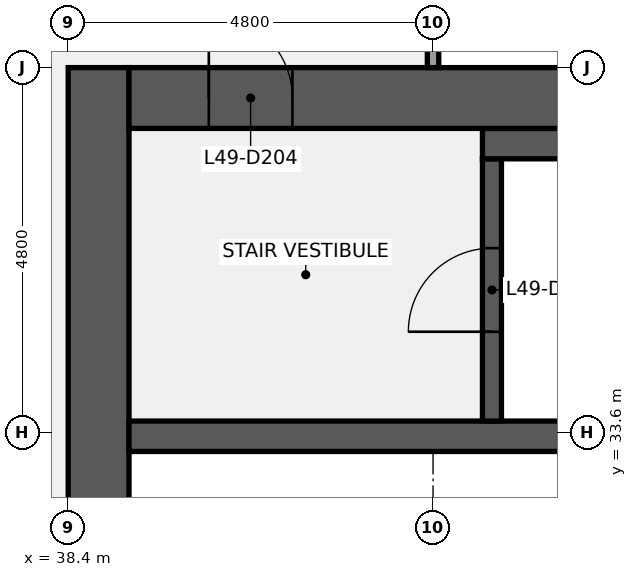
"""IFC4 building model, lengths in metres.
Left out: names, types, materials, properties, quantities, classifications, styles, units other than length and angle.
Written with IfcOpenShell. Run it as: python <this file> out.ifc"""

import sys

from ifc_helpers import new_model, si_unit, direction, frame, frame_2d, origin, place, context, subcontext, project, spatial, rectangle, extrude, element, fill, save


model = new_model("IFC4")
c1 = context("Model", 3, precision=1e-05, world=origin(), true_north=direction((0.0, 1.0)))
c2 = subcontext(c1, "Body", "Model", "MODEL_VIEW")
j1 = project(units=[si_unit("LENGTHUNIT", "METRE"), si_unit("PLANEANGLEUNIT", "RADIAN")], contexts=[c1])
p1 = place(None, origin())
s1 = spatial("IfcSite", under=j1, at=p1, CompositionType="ELEMENT")
p2 = place(p1, origin())
s2 = spatial("IfcBuilding", under=s1, at=p2, CompositionType="ELEMENT")
p3 = place(p2, frame((0.0, 0.0, 225.2)))
s3 = spatial("IfcBuildingStorey", under=s2, at=p3, CompositionType="ELEMENT", Elevation=225.2)
p4 = place(p3, frame((38.8, 9.6, 0.0), z_axis=(0.0, 0.0, 1.0), x_axis=(0.0, 1.0, 0.0)))
e1 = element("IfcWall", 1, at=p4, inside=s3, PredefinedType="SHEAR", context=c2, shape_type="SweptSolid", body=[
    extrude(rectangle(XDim=28.8, YDim=0.8, at=frame_2d((14.4, 0.0))), origin(), (0.0, 0.0, 1.0), 3.84),
])
p5 = place(p4, frame((8.7, 0.0, 0.0)))
e2 = element("IfcOpeningElement", 2, at=p5, cuts=e1, PredefinedType="OPENING", context=c2, shape_type="SweptSolid", body=[
    extrude(rectangle(XDim=1.8, YDim=2.1, at=frame_2d((0.9, 1.05))), frame((0.0, 0.41, 0.0), z_axis=(0.0, -1.0, 0.0), x_axis=(1.0, 0.0, 0.0)), (0.0, 0.0, 1.0), 0.82),
])
p6 = place(p4, frame((18.3, 0.0, 0.0)))
e3 = element("IfcOpeningElement", 3, at=p6, cuts=e1, PredefinedType="OPENING", context=c2, shape_type="SweptSolid", body=[
    extrude(rectangle(XDim=1.8, YDim=2.1, at=frame_2d((0.9, 1.05))), frame((0.0, 0.41, 0.0), z_axis=(0.0, -1.0, 0.0), x_axis=(1.0, 0.0, 0.0)), (0.0, 0.0, 1.0), 0.82),
])
p7 = place(p3, frame((39.2, 33.55, 0.0), z_axis=(0.0, 0.0, 1.0), x_axis=(1.0, 0.0, 0.0)))
e4 = element("IfcWall", 4, at=p7, inside=s3, PredefinedType="SHEAR", context=c2, shape_type="SweptSolid", body=[
    extrude(rectangle(XDim=17.6, YDim=0.4, at=frame_2d((8.8, 0.0))), origin(), (0.0, 0.0, 1.0), 3.84),
])
p8 = place(p3, frame((43.975, 33.75, 0.0), z_axis=(0.0, 0.0, 1.0), x_axis=(0.0, 1.0, 0.0)))
e5 = element("IfcWall", 5, at=p8, inside=s3, PredefinedType="SHEAR", context=c2, shape_type="SweptSolid", body=[
    extrude(rectangle(XDim=3.45, YDim=0.25, at=frame_2d((1.725, 0.0))), origin(), (0.0, 0.0, 1.0), 3.84),
])
p9 = place(p8, frame((1.175, 0.0, 0.0)))
e6 = element("IfcOpeningElement", 6, at=p9, cuts=e5, PredefinedType="OPENING", context=c2, shape_type="SweptSolid", body=[
    extrude(rectangle(XDim=1.1, YDim=2.1, at=frame_2d((0.55, 1.05))), frame((0.0, 0.135, 0.0), z_axis=(0.0, -1.0, 0.0), x_axis=(1.0, 0.0, 0.0)), (0.0, 0.0, 1.0), 0.27),
])
p10 = place(p3, frame((43.85, 37.4, 0.0), z_axis=(0.0, 0.0, 1.0), x_axis=(1.0, 0.0, 0.0)))
e7 = element("IfcWall", 7, at=p10, inside=s3, PredefinedType="SHEAR", context=c2, shape_type="SweptSolid", body=[
    extrude(rectangle(XDim=4.15, YDim=0.4, at=frame_2d((2.075, 0.0))), origin(), (0.0, 0.0, 1.0), 3.84),
])
p11 = place(p3, frame((39.2, 38.0, 0.0), z_axis=(0.0, 0.0, 1.0), x_axis=(1.0, 0.0, 0.0)))
e8 = element("IfcWall", 8, at=p11, inside=s3, PredefinedType="SHEAR", context=c2, shape_type="SweptSolid", body=[
    extrude(rectangle(XDim=8.8, YDim=0.8, at=frame_2d((4.4, 0.0))), origin(), (0.0, 0.0, 1.0), 3.84),
])
p12 = place(p11, frame((1.05, 0.0, 0.0)))
e9 = element("IfcOpeningElement", 9, at=p12, cuts=e8, PredefinedType="OPENING", context=c2, shape_type="SweptSolid", body=[
    extrude(rectangle(XDim=1.1, YDim=2.1, at=frame_2d((0.55, 1.05))), frame((0.0, 0.41, 0.0), z_axis=(0.0, -1.0, 0.0), x_axis=(1.0, 0.0, 0.0)), (0.0, 0.0, 1.0), 0.82),
])
p13 = place(p3, frame((43.2, 38.4, 0.0), z_axis=(0.0, 0.0, 1.0), x_axis=(0.0, 1.0, 0.0)))
e10 = element("IfcWall", 10, at=p13, inside=s3, PredefinedType="PARTITIONING", context=c2, shape_type="SweptSolid", body=[
    extrude(rectangle(XDim=2.325, YDim=0.15, at=frame_2d((1.163, 0.0))), origin(), (0.0, 0.0, 1.0), 2.87),
])
p14 = place(p13, frame((0.663, 0.0, 0.0)))
e11 = element("IfcOpeningElement", 11, at=p14, cuts=e10, PredefinedType="OPENING", context=c2, shape_type="SweptSolid", body=[
    extrude(rectangle(XDim=1.0, YDim=2.1, at=frame_2d((0.5, 1.05))), frame((0.0, 0.085, 0.0), z_axis=(0.0, -1.0, 0.0), x_axis=(1.0, 0.0, 0.0)), (0.0, 0.0, 1.0), 0.17),
])
p15 = place(p9, origin())
e12 = element("IfcDoor", 12, at=p15, inside=s3, OperationType="SINGLE_SWING_LEFT", PredefinedType="DOOR", context=c2, shape_type="SweptSolid", body=[
    extrude(rectangle(XDim=1.1, YDim=2.1, at=frame_2d((0.55, 1.05))), frame((0.0, 0.025, 0.0), z_axis=(0.0, -1.0, 0.0), x_axis=(1.0, 0.0, 0.0)), (0.0, 0.0, 1.0), 0.05),
])
fill(e6, e12)
p16 = place(p12, origin())
e13 = element("IfcDoor", 13, at=p16, inside=s3, OperationType="SINGLE_SWING_LEFT", PredefinedType="DOOR", context=c2, shape_type="SweptSolid", body=[
    extrude(rectangle(XDim=1.1, YDim=2.1, at=frame_2d((0.55, 1.05))), frame((0.0, 0.025, 0.0), z_axis=(0.0, -1.0, 0.0), x_axis=(1.0, 0.0, 0.0)), (0.0, 0.0, 1.0), 0.05),
])
fill(e9, e13)
save(model, sys.argv[1])
